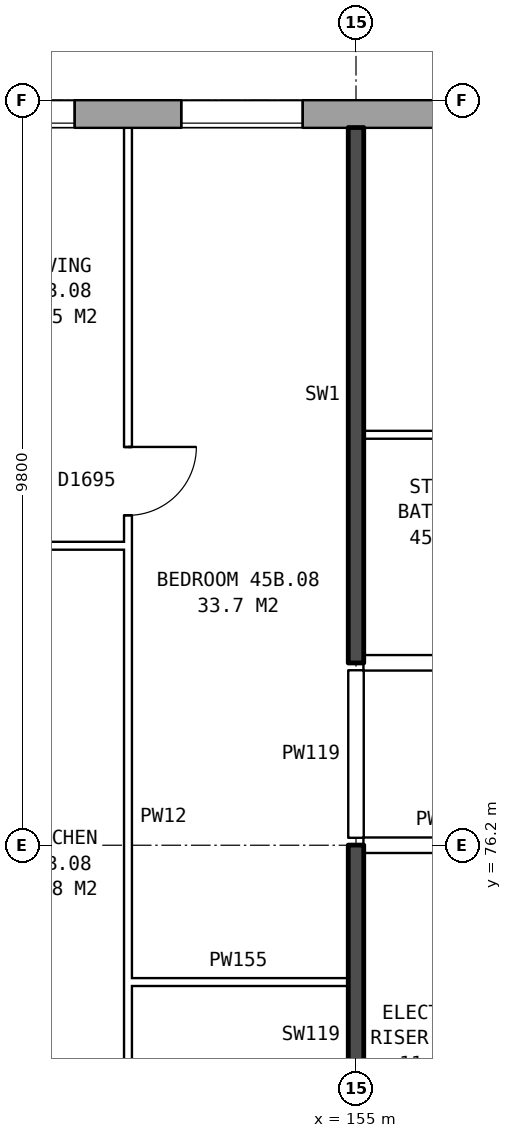
"""IFC4 building model, lengths in metres.
Left out: names, types, materials, properties, quantities, classifications, styles, units other than length and angle.
Written with IfcOpenShell. Run it as: python <this file> out.ifc"""

import sys

from ifc_helpers import new_model, si_unit, direction, frame, frame_2d, origin, place, context, subcontext, project, spatial, rectangle, extrude, element, fill, save


model = new_model("IFC4")
c1 = context("Model", 3, precision=1e-05, world=origin(), true_north=direction((0.0, 1.0)))
c2 = subcontext(c1, "Body", "Model", "MODEL_VIEW")
j1 = project(units=[si_unit("LENGTHUNIT", "METRE"), si_unit("PLANEANGLEUNIT", "RADIAN")], contexts=[c1])
p1 = place(None, origin())
s1 = spatial("IfcSite", under=j1, at=p1, CompositionType="ELEMENT")
p2 = place(p1, origin())
s2 = spatial("IfcBuilding", under=s1, at=p2, CompositionType="ELEMENT")
p3 = place(p2, frame((0.0, 0.0, 160.9)))
s3 = spatial("IfcBuildingStorey", under=s2, at=p3, CompositionType="ELEMENT", Elevation=160.9)
p4 = place(p3, frame((168.425, 85.82, 0.0), z_axis=(0.0, 0.0, 1.0), x_axis=(-1.0, 0.0, 0.0)))
e1 = element("IfcWall", 1, at=p4, inside=s3, PredefinedType="STANDARD", context=c2, shape_type="SweptSolid", body=[
    extrude(rectangle(XDim=34.351, YDim=0.36, at=frame_2d((17.175, 0.0))), origin(), (0.0, 0.0, 1.0), 2.85),
])
p5 = place(p4, frame((2.125, 0.0, 0.8)))
e2 = element("IfcOpeningElement", 2, at=p5, cuts=e1, PredefinedType="OPENING", context=c2, shape_type="SweptSolid", body=[
    extrude(rectangle(XDim=1.6, YDim=1.8, at=frame_2d((0.8, 0.9))), frame((0.0, 0.19, 0.0), z_axis=(0.0, -1.0, 0.0), x_axis=(1.0, 0.0, 0.0)), (0.0, 0.0, 1.0), 0.38),
])
p6 = place(p4, frame((5.125, 0.0, 0.8)))
e3 = element("IfcOpeningElement", 3, at=p6, cuts=e1, PredefinedType="OPENING", context=c2, shape_type="SweptSolid", body=[
    extrude(rectangle(XDim=1.6, YDim=1.8, at=frame_2d((0.8, 0.9))), frame((0.0, 0.19, 0.0), z_axis=(0.0, -1.0, 0.0), x_axis=(1.0, 0.0, 0.0)), (0.0, 0.0, 1.0), 0.38),
])
p7 = place(p4, frame((8.125, 0.0, 0.8)))
e4 = element("IfcOpeningElement", 4, at=p7, cuts=e1, PredefinedType="OPENING", context=c2, shape_type="SweptSolid", body=[
    extrude(rectangle(XDim=1.6, YDim=1.8, at=frame_2d((0.8, 0.9))), frame((0.0, 0.19, 0.0), z_axis=(0.0, -1.0, 0.0), x_axis=(1.0, 0.0, 0.0)), (0.0, 0.0, 1.0), 0.38),
])
p8 = place(p4, frame((10.025, 0.0, 0.8)))
e5 = element("IfcOpeningElement", 5, at=p8, cuts=e1, PredefinedType="OPENING", context=c2, shape_type="SweptSolid", body=[
    extrude(rectangle(XDim=1.0, YDim=1.8, at=frame_2d((0.5, 0.9))), frame((0.0, 0.19, 0.0), z_axis=(0.0, -1.0, 0.0), x_axis=(1.0, 0.0, 0.0)), (0.0, 0.0, 1.0), 0.38),
])
p9 = place(p4, frame((14.125, 0.0, 0.8)))
e6 = element("IfcOpeningElement", 6, at=p9, cuts=e1, PredefinedType="OPENING", context=c2, shape_type="SweptSolid", body=[
    extrude(rectangle(XDim=1.6, YDim=1.8, at=frame_2d((0.8, 0.9))), frame((0.0, 0.19, 0.0), z_axis=(0.0, -1.0, 0.0), x_axis=(1.0, 0.0, 0.0)), (0.0, 0.0, 1.0), 0.38),
])
p10 = place(p4, frame((17.125, 0.0, 0.8)))
e7 = element("IfcOpeningElement", 7, at=p10, cuts=e1, PredefinedType="OPENING", context=c2, shape_type="SweptSolid", body=[
    extrude(rectangle(XDim=1.6, YDim=1.8, at=frame_2d((0.8, 0.9))), frame((0.0, 0.19, 0.0), z_axis=(0.0, -1.0, 0.0), x_axis=(1.0, 0.0, 0.0)), (0.0, 0.0, 1.0), 0.38),
])
p11 = place(p4, frame((19.625, 0.0, 0.65)))
e8 = element("IfcOpeningElement", 8, at=p11, cuts=e1, PredefinedType="OPENING", context=c2, shape_type="SweptSolid", body=[
    extrude(rectangle(XDim=0.6, YDim=1.8, at=frame_2d((0.3, 0.9))), frame((0.0, 0.19, 0.0), z_axis=(0.0, -1.0, 0.0), x_axis=(1.0, 0.0, 0.0)), (0.0, 0.0, 1.0), 0.38),
])
p12 = place(p4, frame((23.125, 0.0, 0.8)))
e9 = element("IfcOpeningElement", 9, at=p12, cuts=e1, PredefinedType="OPENING", context=c2, shape_type="SweptSolid", body=[
    extrude(rectangle(XDim=1.6, YDim=1.8, at=frame_2d((0.8, 0.9))), frame((0.0, 0.19, 0.0), z_axis=(0.0, -1.0, 0.0), x_axis=(1.0, 0.0, 0.0)), (0.0, 0.0, 1.0), 0.38),
])
p13 = place(p4, frame((26.125, 0.0, 0.8)))
e10 = element("IfcOpeningElement", 10, at=p13, cuts=e1, PredefinedType="OPENING", context=c2, shape_type="SweptSolid", body=[
    extrude(rectangle(XDim=1.6, YDim=1.8, at=frame_2d((0.8, 0.9))), frame((0.0, 0.19, 0.0), z_axis=(0.0, -1.0, 0.0), x_axis=(1.0, 0.0, 0.0)), (0.0, 0.0, 1.0), 0.38),
])
p14 = place(p4, frame((29.125, 0.0, 0.8)))
e11 = element("IfcOpeningElement", 11, at=p14, cuts=e1, PredefinedType="OPENING", context=c2, shape_type="SweptSolid", body=[
    extrude(rectangle(XDim=1.6, YDim=1.8, at=frame_2d((0.8, 0.9))), frame((0.0, 0.19, 0.0), z_axis=(0.0, -1.0, 0.0), x_axis=(1.0, 0.0, 0.0)), (0.0, 0.0, 1.0), 0.38),
])
p15 = place(p4, frame((32.125, 0.0, 0.8)))
e12 = element("IfcOpeningElement", 12, at=p15, cuts=e1, PredefinedType="OPENING", context=c2, shape_type="SweptSolid", body=[
    extrude(rectangle(XDim=1.6, YDim=1.8, at=frame_2d((0.8, 0.9))), frame((0.0, 0.19, 0.0), z_axis=(0.0, -1.0, 0.0), x_axis=(1.0, 0.0, 0.0)), (0.0, 0.0, 1.0), 0.38),
])
p16 = place(p4, frame((11.325, 0.0, 1.7)))
e13 = element("IfcOpeningElement", 13, at=p16, cuts=e1, PredefinedType="OPENING", context=c2, shape_type="SweptSolid", body=[
    extrude(rectangle(XDim=0.8, YDim=0.9, at=frame_2d((0.4, 0.45))), frame((0.0, 0.19, 0.0), z_axis=(0.0, -1.0, 0.0), x_axis=(1.0, 0.0, 0.0)), (0.0, 0.0, 1.0), 0.38),
])
p17 = place(p4, frame((20.525, 0.0, 0.55)))
e14 = element("IfcOpeningElement", 14, at=p17, cuts=e1, PredefinedType="OPENING", context=c2, shape_type="SweptSolid", body=[
    extrude(rectangle(XDim=0.8, YDim=0.9, at=frame_2d((0.4, 0.45))), frame((0.0, 0.19, 0.0), z_axis=(0.0, -1.0, 0.0), x_axis=(1.0, 0.0, 0.0)), (0.0, 0.0, 1.0), 0.38),
])
p18 = place(p3, frame((152.0, 74.4, 0.0), z_axis=(0.0, 0.0, 1.0), x_axis=(1.0, 0.0, 0.0)))
e15 = element("IfcWall", 15, at=p18, inside=s3, PredefinedType="PARTITIONING", context=c2, shape_type="SweptSolid", body=[
    extrude(rectangle(XDim=2.9, YDim=0.1, at=frame_2d((1.45, 0.0))), origin(), (0.0, 0.0, 1.0), 2.85),
])
p19 = place(p3, frame((155.1, 76.2, 0.0), z_axis=(0.0, 0.0, 1.0), x_axis=(1.0, 0.0, 0.0)))
e16 = element("IfcWall", 16, at=p19, inside=s3, PredefinedType="PARTITIONING", context=c2, shape_type="SweptSolid", body=[
    extrude(rectangle(XDim=2.14, YDim=0.2, at=frame_2d((1.07, 0.0))), origin(), (0.0, 0.0, 1.0), 2.85),
])
p20 = place(p3, frame((155.1, 78.6, 0.0), z_axis=(0.0, 0.0, 1.0), x_axis=(1.0, 0.0, 0.0)))
e17 = element("IfcWall", 17, at=p20, inside=s3, PredefinedType="PARTITIONING", context=c2, shape_type="SweptSolid", body=[
    extrude(rectangle(XDim=16.04, YDim=0.2, at=frame_2d((8.02, 0.0))), origin(), (0.0, 0.0, 1.0), 2.85),
])
p21 = place(p20, frame((3.6, 0.0, 0.0)))
e18 = element("IfcOpeningElement", 18, at=p21, cuts=e17, PredefinedType="OPENING", context=c2, shape_type="SweptSolid", body=[
    extrude(rectangle(XDim=1.0, YDim=2.1, at=frame_2d((0.5, 1.05))), frame((0.0, 0.11, 0.0), z_axis=(0.0, -1.0, 0.0), x_axis=(1.0, 0.0, 0.0)), (0.0, 0.0, 1.0), 0.22),
])
p22 = place(p20, frame((8.4, 0.0, 0.0)))
e19 = element("IfcOpeningElement", 19, at=p22, cuts=e17, PredefinedType="OPENING", context=c2, shape_type="SweptSolid", body=[
    extrude(rectangle(XDim=1.0, YDim=2.1, at=frame_2d((0.5, 1.05))), frame((0.0, 0.11, 0.0), z_axis=(0.0, -1.0, 0.0), x_axis=(1.0, 0.0, 0.0)), (0.0, 0.0, 1.0), 0.22),
])
p23 = place(p3, frame((146.0, 80.14, 0.0), z_axis=(0.0, 0.0, 1.0), x_axis=(1.0, 0.0, 0.0)))
e20 = element("IfcWall", 20, at=p23, inside=s3, PredefinedType="PARTITIONING", context=c2, shape_type="SweptSolid", body=[
    extrude(rectangle(XDim=6.0, YDim=0.1, at=frame_2d((3.0, 0.0))), origin(), (0.0, 0.0, 1.0), 2.85),
])
p24 = place(p23, frame((1.05, 0.0, 0.0)))
e21 = element("IfcOpeningElement", 21, at=p24, cuts=e20, PredefinedType="OPENING", context=c2, shape_type="SweptSolid", body=[
    extrude(rectangle(XDim=0.9, YDim=2.1, at=frame_2d((0.45, 1.05))), frame((0.0, 0.06, 0.0), z_axis=(0.0, -1.0, 0.0), x_axis=(1.0, 0.0, 0.0)), (0.0, 0.0, 1.0), 0.12),
])
p25 = place(p23, frame((4.05, 0.0, 0.0)))
e22 = element("IfcOpeningElement", 22, at=p25, cuts=e20, PredefinedType="OPENING", context=c2, shape_type="SweptSolid", body=[
    extrude(rectangle(XDim=0.9, YDim=2.1, at=frame_2d((0.45, 1.05))), frame((0.0, 0.06, 0.0), z_axis=(0.0, -1.0, 0.0), x_axis=(1.0, 0.0, 0.0)), (0.0, 0.0, 1.0), 0.12),
])
p26 = place(p3, frame((155.1, 81.6, 0.0), z_axis=(0.0, 0.0, 1.0), x_axis=(1.0, 0.0, 0.0)))
e23 = element("IfcWall", 23, at=p26, inside=s3, PredefinedType="PARTITIONING", context=c2, shape_type="SweptSolid", body=[
    extrude(rectangle(XDim=2.3, YDim=0.1, at=frame_2d((1.15, 0.0))), origin(), (0.0, 0.0, 1.0), 2.85),
])
p27 = place(p3, frame((152.0, 71.3, 0.0), z_axis=(0.0, 0.0, 1.0), x_axis=(0.0, 1.0, 0.0)))
e24 = element("IfcWall", 24, at=p27, inside=s3, PredefinedType="PARTITIONING", context=c2, shape_type="SweptSolid", body=[
    extrude(rectangle(XDim=14.34, YDim=0.1, at=frame_2d((7.17, 0.0))), origin(), (0.0, 0.0, 1.0), 2.85),
])
p28 = place(p27, frame((9.24, 0.0, 0.0)))
e25 = element("IfcOpeningElement", 25, at=p28, cuts=e24, PredefinedType="OPENING", context=c2, shape_type="SweptSolid", body=[
    extrude(rectangle(XDim=0.9, YDim=2.1, at=frame_2d((0.45, 1.05))), frame((0.0, 0.06, 0.0), z_axis=(0.0, -1.0, 0.0), x_axis=(1.0, 0.0, 0.0)), (0.0, 0.0, 1.0), 0.12),
])
p29 = place(p27, frame((0.4, 0.0, 0.0)))
e26 = element("IfcOpeningElement", 26, at=p29, cuts=e24, PredefinedType="OPENING", context=c2, shape_type="SweptSolid", body=[
    extrude(rectangle(XDim=0.9, YDim=2.1, at=frame_2d((0.45, 1.05))), frame((0.0, 0.06, 0.0), z_axis=(0.0, -1.0, 0.0), x_axis=(1.0, 0.0, 0.0)), (0.0, 0.0, 1.0), 0.12),
])
p30 = place(p3, frame((155.0, 71.2, 0.0), z_axis=(0.0, 0.0, 1.0), x_axis=(0.0, 1.0, 0.0)))
e27 = element("IfcWall", 27, at=p30, inside=s3, PredefinedType="SOLIDWALL", context=c2, shape_type="SweptSolid", body=[
    extrude(rectangle(XDim=5.0, YDim=0.2, at=frame_2d((2.5, 0.0))), origin(), (0.0, 0.0, 1.0), 2.85),
])
p31 = place(p3, frame((155.0, 76.3, 0.0), z_axis=(0.0, 0.0, 1.0), x_axis=(0.0, 1.0, 0.0)))
e28 = element("IfcWall", 28, at=p31, inside=s3, PredefinedType="PARTITIONING", context=c2, shape_type="SweptSolid", body=[
    extrude(rectangle(XDim=2.2, YDim=0.2, at=frame_2d((1.1, 0.0))), origin(), (0.0, 0.0, 1.0), 2.85),
])
p32 = place(p3, frame((155.0, 78.6, 0.0), z_axis=(0.0, 0.0, 1.0), x_axis=(0.0, 1.0, 0.0)))
e29 = element("IfcWall", 29, at=p32, inside=s3, PredefinedType="SOLIDWALL", context=c2, shape_type="SweptSolid", body=[
    extrude(rectangle(XDim=7.04, YDim=0.2, at=frame_2d((3.52, 0.0))), origin(), (0.0, 0.0, 1.0), 2.85),
])
p33 = place(p9, origin())
e30 = element("IfcWindow", 30, at=p33, inside=s3, PartitioningType="SINGLE_PANEL", PredefinedType="WINDOW", context=c2, shape_type="SweptSolid", body=[
    extrude(rectangle(XDim=1.6, YDim=1.8, at=frame_2d((0.8, 0.9))), frame((0.0, 0.15, 0.0), z_axis=(0.0, -1.0, 0.0), x_axis=(1.0, 0.0, 0.0)), (0.0, 0.0, 1.0), 0.06),
])
fill(e6, e30)
p34 = place(p10, origin())
e31 = element("IfcWindow", 31, at=p34, inside=s3, PartitioningType="SINGLE_PANEL", PredefinedType="WINDOW", context=c2, shape_type="SweptSolid", body=[
    extrude(rectangle(XDim=1.6, YDim=1.8, at=frame_2d((0.8, 0.9))), frame((0.0, 0.15, 0.0), z_axis=(0.0, -1.0, 0.0), x_axis=(1.0, 0.0, 0.0)), (0.0, 0.0, 1.0), 0.06),
])
fill(e7, e31)
p35 = place(p28, frame((0.9, 0.0, 0.0), z_axis=(0.0, 0.0, 1.0), x_axis=(-1.0, 0.0, 0.0)))
e32 = element("IfcDoor", 32, at=p35, inside=s3, OperationType="SINGLE_SWING_LEFT", PredefinedType="DOOR", context=c2, shape_type="SweptSolid", body=[
    extrude(rectangle(XDim=0.9, YDim=2.1, at=frame_2d((0.45, 1.05))), frame((0.0, 0.025, 0.0), z_axis=(0.0, -1.0, 0.0), x_axis=(1.0, 0.0, 0.0)), (0.0, 0.0, 1.0), 0.05),
])
fill(e25, e32)
save(model, sys.argv[1])
